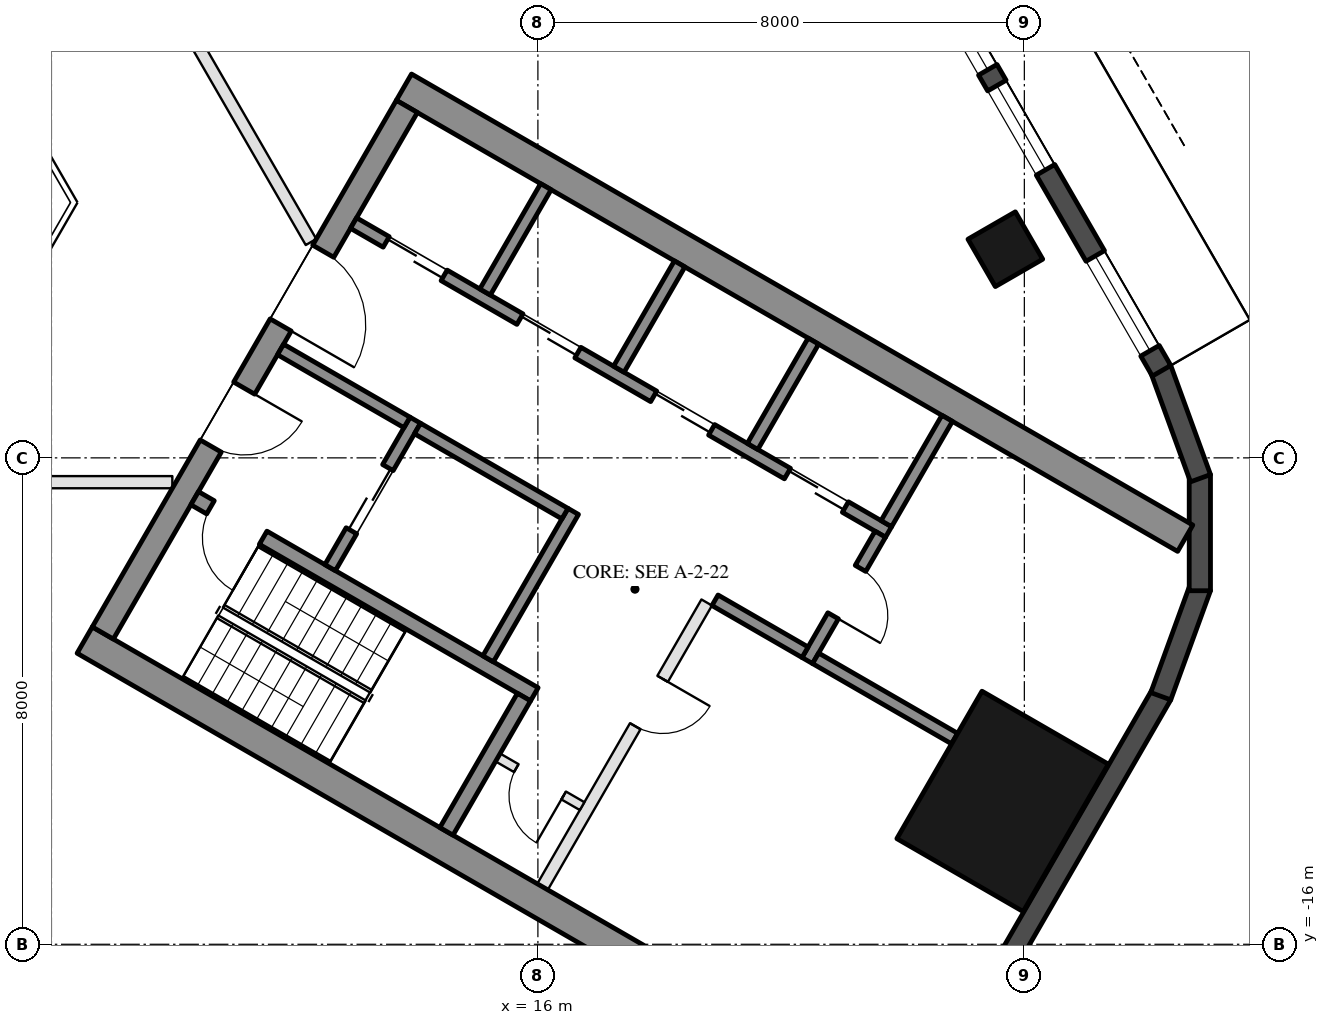
"""IFC4 building model, lengths in metres.
Left out: names, types, materials, properties, quantities, classifications, styles, units other than length and angle.
Written with IfcOpenShell. Run it as: python <this file> out.ifc"""

import sys

from ifc_helpers import new_model, si_unit, direction, frame, frame_2d, origin, origin_2d, place, context, subcontext, project, spatial, rectangle, hollow_rectangle, extrude, element, fill, save


model = new_model("IFC4")
c1 = context("Model", 3, precision=1e-05, world=origin(), true_north=direction((0.0, 1.0)))
c2 = subcontext(c1, "Body", "Model", "MODEL_VIEW")
j1 = project(units=[si_unit("LENGTHUNIT", "METRE"), si_unit("PLANEANGLEUNIT", "RADIAN")], contexts=[c1])
p1 = place(None, origin())
s1 = spatial("IfcSite", under=j1, at=p1, CompositionType="ELEMENT")
p2 = place(p1, origin())
s2 = spatial("IfcBuilding", under=s1, at=p2, CompositionType="ELEMENT")
p3 = place(p2, frame((0.0, 0.0, 102.0)))
s3 = spatial("IfcBuildingStorey", under=s2, at=p3, CompositionType="ELEMENT", Elevation=102.0)
p4 = place(p3, frame((23.688, -4.568, 0.0), z_axis=(0.0, 0.0, 1.0), x_axis=(-0.5, 0.866025403784, 0.0)))
e1 = element("IfcColumn", 1, at=p4, inside=s3, PredefinedType="COLUMN", context=c2, shape_type="SweptSolid", body=[
    extrude(hollow_rectangle(XDim=0.9, YDim=0.9, WallThickness=0.04, at=origin_2d()), origin(), (0.0, 0.0, 1.0), 3.7),
])
p5 = place(p3, frame((23.643, -13.65, 0.0), z_axis=(0.0, 0.0, 1.0), x_axis=(0.5, 0.866025403784, 0.0)))
e2 = element("IfcColumn", 2, at=p5, inside=s3, PredefinedType="COLUMN", context=c2, shape_type="SweptSolid", body=[
    extrude(hollow_rectangle(XDim=2.8, YDim=2.4, WallThickness=0.07, at=origin_2d()), origin(), (0.0, 0.0, 1.0), 3.7),
])
p6 = place(p3, frame((23.427, -16.792, 0.0), z_axis=(0.0, 0.0, 1.0), x_axis=(0.500018773155, 0.866014564827, 0.0)))
e3 = element("IfcWall", 3, at=p6, inside=s3, PredefinedType="SOLIDWALL", context=c2, shape_type="SweptSolid", body=[
    extrude(rectangle(XDim=5.658, YDim=0.35, at=frame_2d((2.829, 0.0))), origin(), (0.0, 0.0, 1.0), 3.55),
])
for number, where, z_axis, x_axis in (
    (4, (26.244, -11.92, 0.0), (0.0, 0.0, 1.0), (0.342, 0.94, 0.0)),
    (5, (26.886, -10.185, 0.0), (0.0, 0.0, 1.0), (0.0, 1.0, 0.0)),
    (6, (26.897, -8.335, 0.0), (0.0, 0.0, 1.0), (-0.342, 0.94, 0.0)),
):
    element("IfcWall", number, at=place(p3, frame(where, z_axis=z_axis, x_axis=x_axis)), inside=s3, PredefinedType="SOLIDWALL", context=c2, shape_type="SweptSolid", body=[
        extrude(rectangle(XDim=1.91, YDim=0.35, at=frame_2d((0.955, 0.0))), origin(), (0.0, 0.0, 1.0), 3.55),
    ])
p7 = place(p3, frame((26.257, -6.567, 0.0), z_axis=(0.0, 0.0, 1.0), x_axis=(-0.500023526245, 0.866011820475, 0.0)))
e7 = element("IfcWall", 7, at=p7, inside=s3, PredefinedType="SOLIDWALL", context=c2, shape_type="SweptSolid", body=[
    extrude(rectangle(XDim=11.816, YDim=0.35, at=frame_2d((5.908, 0.0))), origin(), (0.0, 0.0, 1.0), 3.55),
])
p8 = place(p7, frame((0.38, 0.0, 0.3)))
e8 = element("IfcOpeningElement", 8, at=p8, cuts=e7, PredefinedType="OPENING", context=c2, shape_type="SweptSolid", body=[
    extrude(rectangle(XDim=1.8, YDim=2.65, at=frame_2d((0.9, 1.325))), frame((0.0, 0.185, 0.0), z_axis=(0.0, -1.0, 0.0), x_axis=(1.0, 0.0, 0.0)), (0.0, 0.0, 1.0), 0.37),
])
p9 = place(p7, frame((7.716, 0.0, 0.0)))
e9 = element("IfcOpeningElement", 9, at=p9, cuts=e7, PredefinedType="OPENING", context=c2, shape_type="SweptSolid", body=[
    extrude(rectangle(XDim=2.4, YDim=2.4, at=frame_2d((1.2, 1.2))), frame((0.0, 0.185, 0.0), z_axis=(0.0, -1.0, 0.0), x_axis=(1.0, 0.0, 0.0)), (0.0, 0.0, 1.0), 0.37),
])
p10 = place(p7, frame((3.816, 0.0, 0.3)))
e10 = element("IfcOpeningElement", 10, at=p10, cuts=e7, PredefinedType="OPENING", context=c2, shape_type="SweptSolid", body=[
    extrude(rectangle(XDim=1.6, YDim=2.65, at=frame_2d((0.8, 1.325))), frame((0.0, 0.185, 0.0), z_axis=(0.0, -1.0, 0.0), x_axis=(1.0, 0.0, 0.0)), (0.0, 0.0, 1.0), 0.37),
])
p11 = place(p7, frame((5.716, 0.0, 0.3)))
e11 = element("IfcOpeningElement", 11, at=p11, cuts=e7, PredefinedType="OPENING", context=c2, shape_type="SweptSolid", body=[
    extrude(rectangle(XDim=1.6, YDim=2.65, at=frame_2d((0.8, 1.325))), frame((0.0, 0.185, 0.0), z_axis=(0.0, -1.0, 0.0), x_axis=(1.0, 0.0, 0.0)), (0.0, 0.0, 1.0), 0.37),
])
for number, where, z_axis, x_axis in (
    (12, (8.547, -10.997, 0.0), (0.0, 0.0, 1.0), (0.866, -0.5, 0.0)),
    (13, (13.797, -1.903, 0.0), (0.0, 0.0, 1.0), (0.866, -0.5, 0.0)),
):
    element("IfcWall", number, at=place(p3, frame(where, z_axis=z_axis, x_axis=x_axis)), inside=s3, PredefinedType="SHEAR", context=c2, shape_type="SweptSolid", body=[
        extrude(rectangle(XDim=14.837, YDim=0.5, at=frame_2d((7.418, 0.0))), origin(), (0.0, 0.0, 1.0), 3.5),
    ])
p12 = place(p3, frame((8.845, -10.88, 0.0), z_axis=(0.0, 0.0, 1.0), x_axis=(0.500004234368, 0.866022959057, 0.0)))
e14 = element("IfcWall", 14, at=p12, inside=s3, PredefinedType="SHEAR", context=c2, shape_type="SweptSolid", body=[
    extrude(rectangle(XDim=10.0, YDim=0.4, at=frame_2d((5.0, 0.0))), origin(), (0.0, 0.0, 1.0), 3.5),
])
p13 = place(p12, frame((3.55, 0.0, 0.0)))
e15 = element("IfcOpeningElement", 15, at=p13, cuts=e14, PredefinedType="OPENING", context=c2, shape_type="SweptSolid", body=[
    extrude(rectangle(XDim=1.1, YDim=2.1, at=frame_2d((0.55, 1.05))), frame((0.0, 0.21, 0.0), z_axis=(0.0, -1.0, 0.0), x_axis=(1.0, 0.0, 0.0)), (0.0, 0.0, 1.0), 0.42),
])
p14 = place(p12, frame((5.85, 0.0, 0.0)))
e16 = element("IfcOpeningElement", 16, at=p14, cuts=e14, PredefinedType="OPENING", context=c2, shape_type="SweptSolid", body=[
    extrude(rectangle(XDim=1.4, YDim=2.1, at=frame_2d((0.7, 1.05))), frame((0.0, 0.21, 0.0), z_axis=(0.0, -1.0, 0.0), x_axis=(1.0, 0.0, 0.0)), (0.0, 0.0, 1.0), 0.42),
])
p15 = place(p3, frame((10.356, -8.664, 0.0), z_axis=(0.0, 0.0, 1.0), x_axis=(0.866028629588, -0.499994412703, 0.0)))
e17 = element("IfcWall", 17, at=p15, inside=s3, PredefinedType="SHEAR", context=c2, shape_type="SweptSolid", body=[
    extrude(rectangle(XDim=6.45, YDim=0.25, at=frame_2d((3.225, 0.0))), origin(), (0.0, 0.0, 1.0), 3.5),
])
p16 = place(p15, frame((0.3, 0.0, 0.0)))
e18 = element("IfcOpeningElement", 18, at=p16, cuts=e17, PredefinedType="OPENING", context=c2, shape_type="SweptSolid", body=[
    extrude(rectangle(XDim=1.0, YDim=2.1, at=frame_2d((0.5, 1.05))), frame((0.0, 0.135, 0.0), z_axis=(0.0, -1.0, 0.0), x_axis=(1.0, 0.0, 0.0)), (0.0, 0.0, 1.0), 0.27),
])
p17 = place(p3, frame((14.496, -14.143, 0.0), z_axis=(0.0, 0.0, 1.0), x_axis=(0.500062241894, 0.865989465428, 0.0)))
e19 = element("IfcWall", 19, at=p17, inside=s3, PredefinedType="SHEAR", context=c2, shape_type="SweptSolid", body=[
    extrude(rectangle(XDim=2.55, YDim=0.25, at=frame_2d((1.275, 0.0))), origin(), (0.0, 0.0, 1.0), 3.5),
])
p18 = place(p3, frame((15.181, -11.305, 0.0), z_axis=(0.0, 0.0, 1.0), x_axis=(0.49994636267, 0.866056369097, 0.0)))
e20 = element("IfcWall", 20, at=p18, inside=s3, PredefinedType="SHEAR", context=c2, shape_type="SweptSolid", body=[
    extrude(rectangle(XDim=2.8, YDim=0.2, at=frame_2d((1.4, 0.0))), origin(), (0.0, 0.0, 1.0), 3.5),
])
p19 = place(p3, frame((12.583, -9.805, 0.0), z_axis=(0.0, 0.0, 1.0), x_axis=(0.49994636267, 0.866056369097, 0.0)))
e21 = element("IfcWall", 21, at=p19, inside=s3, PredefinedType="SHEAR", context=c2, shape_type="SweptSolid", body=[
    extrude(rectangle(XDim=2.8, YDim=0.2, at=frame_2d((1.4, 0.0))), origin(), (0.0, 0.0, 1.0), 3.5),
])
p20 = place(p19, frame((0.7, 0.0, 0.0)))
e22 = element("IfcOpeningElement", 22, at=p20, cuts=e21, PredefinedType="OPENING", context=c2, shape_type="SweptSolid", body=[
    extrude(rectangle(XDim=1.2, YDim=2.1, at=frame_2d((0.6, 1.05))), frame((0.0, 0.11, 0.0), z_axis=(0.0, -1.0, 0.0), x_axis=(1.0, 0.0, 0.0)), (0.0, 0.0, 1.0), 0.22),
])
p21 = place(p3, frame((11.768, -6.217, 0.0), z_axis=(0.0, 0.0, 1.0), x_axis=(0.866050077142, -0.499957262057, 0.0)))
e23 = element("IfcWall", 23, at=p21, inside=s3, PredefinedType="SHEAR", context=c2, shape_type="SweptSolid", body=[
    extrude(rectangle(XDim=2.4, YDim=0.2, at=frame_2d((1.2, 0.0))), origin(), (0.0, 0.0, 1.0), 3.5),
])
p22 = place(p3, frame((14.02, -7.517, 0.0), z_axis=(0.0, 0.0, 1.0), x_axis=(0.866034573852, -0.49998411664, 0.0)))
e24 = element("IfcWall", 24, at=p22, inside=s3, PredefinedType="SHEAR", context=c2, shape_type="SweptSolid", body=[
    extrude(rectangle(XDim=2.8, YDim=0.2, at=frame_2d((1.4, 0.0))), origin(), (0.0, 0.0, 1.0), 3.5),
])
p23 = place(p3, frame((12.968, -4.138, 0.0), z_axis=(0.0, 0.0, 1.0), x_axis=(0.866028328073, -0.49999493495, 0.0)))
e25 = element("IfcWall", 25, at=p23, inside=s3, PredefinedType="SHEAR", context=c2, shape_type="SweptSolid", body=[
    extrude(rectangle(XDim=10.16, YDim=0.2, at=frame_2d((5.08, 0.0))), origin(), (0.0, 0.0, 1.0), 3.5),
])
p24 = place(p23, frame((0.62, 0.0, 0.0)))
e26 = element("IfcOpeningElement", 26, at=p24, cuts=e25, PredefinedType="OPENING", context=c2, shape_type="SweptSolid", body=[
    extrude(rectangle(XDim=1.1, YDim=2.1, at=frame_2d((0.55, 1.05))), frame((0.0, 0.11, 0.0), z_axis=(0.0, -1.0, 0.0), x_axis=(1.0, 0.0, 0.0)), (0.0, 0.0, 1.0), 0.22),
])
p25 = place(p23, frame((3.16, 0.0, 0.0)))
e27 = element("IfcOpeningElement", 27, at=p25, cuts=e25, PredefinedType="OPENING", context=c2, shape_type="SweptSolid", body=[
    extrude(rectangle(XDim=1.1, YDim=2.1, at=frame_2d((0.55, 1.05))), frame((0.0, 0.11, 0.0), z_axis=(0.0, -1.0, 0.0), x_axis=(1.0, 0.0, 0.0)), (0.0, 0.0, 1.0), 0.22),
])
p26 = place(p23, frame((5.7, 0.0, 0.0)))
e28 = element("IfcOpeningElement", 28, at=p26, cuts=e25, PredefinedType="OPENING", context=c2, shape_type="SweptSolid", body=[
    extrude(rectangle(XDim=1.1, YDim=2.1, at=frame_2d((0.55, 1.05))), frame((0.0, 0.11, 0.0), z_axis=(0.0, -1.0, 0.0), x_axis=(1.0, 0.0, 0.0)), (0.0, 0.0, 1.0), 0.22),
])
p27 = place(p23, frame((8.24, 0.0, 0.0)))
e29 = element("IfcOpeningElement", 29, at=p27, cuts=e25, PredefinedType="OPENING", context=c2, shape_type="SweptSolid", body=[
    extrude(rectangle(XDim=1.1, YDim=2.1, at=frame_2d((0.55, 1.05))), frame((0.0, 0.11, 0.0), z_axis=(0.0, -1.0, 0.0), x_axis=(1.0, 0.0, 0.0)), (0.0, 0.0, 1.0), 0.22),
])
p28 = place(p3, frame((20.43, -11.333, 0.0), z_axis=(0.0, 0.0, 1.0), x_axis=(0.500001309137, 0.866024647952, 0.0)))
e30 = element("IfcWall", 30, at=p28, inside=s3, PredefinedType="SHEAR", context=c2, shape_type="SweptSolid", body=[
    extrude(rectangle(XDim=2.4, YDim=0.2, at=frame_2d((1.2, 0.0))), origin(), (0.0, 0.0, 1.0), 3.5),
])
p29 = place(p28, frame((0.85, 0.0, 0.0)))
e31 = element("IfcOpeningElement", 31, at=p29, cuts=e30, PredefinedType="OPENING", context=c2, shape_type="SweptSolid", body=[
    extrude(rectangle(XDim=0.9, YDim=2.1, at=frame_2d((0.45, 1.05))), frame((0.0, 0.11, 0.0), z_axis=(0.0, -1.0, 0.0), x_axis=(1.0, 0.0, 0.0)), (0.0, 0.0, 1.0), 0.22),
])
p30 = place(p3, frame((18.913, -10.342, 0.0), z_axis=(0.0, 0.0, 1.0), x_axis=(0.866038183914, -0.499977863513, 0.0)))
e32 = element("IfcWall", 32, at=p30, inside=s3, PredefinedType="SHEAR", context=c2, shape_type="SweptSolid", body=[
    extrude(rectangle(XDim=1.71, YDim=0.2, at=frame_2d((0.855, 0.0))), origin(), (0.0, 0.0, 1.0), 3.5),
])
for number, where, z_axis, x_axis in (
    (33, (15.131, -5.272, 0.0), (0.0, 0.0, 1.0), (0.5, 0.866, 0.0)),
    (34, (17.331, -6.542, 0.0), (0.0, 0.0, 1.0), (0.5, 0.866, 0.0)),
    (35, (19.531, -7.812, 0.0), (0.0, 0.0, 1.0), (0.5, 0.866, 0.0)),
    (36, (21.73, -9.082, 0.0), (0.0, 0.0, 1.0), (0.5, 0.866, 0.0)),
):
    element("IfcWall", number, at=place(p3, frame(where, z_axis=z_axis, x_axis=x_axis)), inside=s3, PredefinedType="SHEAR", context=c2, shape_type="SweptSolid", body=[
        extrude(rectangle(XDim=2.0, YDim=0.2, at=frame_2d((1.0, 0.0))), origin(), (0.0, 0.0, 1.0), 3.5),
    ])
p31 = place(p3, frame((20.567, -11.297, 0.0), z_axis=(0.0, 0.0, 1.0), x_axis=(0.866060851709, -0.499938597367, 0.0)))
e37 = element("IfcWall", 37, at=p31, inside=s3, PredefinedType="SHEAR", context=c2, shape_type="SweptSolid", body=[
    extrude(rectangle(XDim=2.64, YDim=0.2, at=frame_2d((1.32, 0.0))), origin(), (0.0, 0.0, 1.0), 3.5),
])
p32 = place(p3, frame((16.076, -15.055, 0.0), z_axis=(0.0, 0.0, 1.0), x_axis=(0.499995103361, 0.866028230842, 0.0)))
e38 = element("IfcWall", 38, at=p32, inside=s3, PredefinedType="PARTITIONING", context=c2, shape_type="SweptSolid", body=[
    extrude(rectangle(XDim=5.4, YDim=0.2, at=frame_2d((2.7, 0.0))), origin(), (0.0, 0.0, 1.0), 3.5),
])
p33 = place(p32, frame((3.05, 0.0, 0.0)))
e39 = element("IfcOpeningElement", 39, at=p33, cuts=e38, PredefinedType="OPENING", context=c2, shape_type="SweptSolid", body=[
    extrude(rectangle(XDim=0.9, YDim=2.1, at=frame_2d((0.45, 1.05))), frame((0.0, 0.11, 0.0), z_axis=(0.0, -1.0, 0.0), x_axis=(1.0, 0.0, 0.0)), (0.0, 0.0, 1.0), 0.22),
])
p34 = place(p3, frame((15.342, -12.928, 0.0), z_axis=(0.0, 0.0, 1.0), x_axis=(0.865989903783, -0.500061482766, 0.0)))
e40 = element("IfcWall", 40, at=p34, inside=s3, PredefinedType="PARTITIONING", context=c2, shape_type="SweptSolid", body=[
    extrude(rectangle(XDim=1.6, YDim=0.15, at=frame_2d((0.8, 0.0))), origin(), (0.0, 0.0, 1.0), 3.5),
])
p35 = place(p34, frame((0.35, 0.0, 0.0)))
e41 = element("IfcOpeningElement", 41, at=p35, cuts=e40, PredefinedType="OPENING", context=c2, shape_type="SweptSolid", body=[
    extrude(rectangle(XDim=0.9, YDim=2.1, at=frame_2d((0.45, 1.05))), frame((0.0, 0.085, 0.0), z_axis=(0.0, -1.0, 0.0), x_axis=(1.0, 0.0, 0.0)), (0.0, 0.0, 1.0), 0.17),
])
p36 = place(p3, frame((9.988, -8.4, 0.0), z_axis=(0.0, 0.0, 1.0), x_axis=(-1.0, 0.0, 0.0)))
e42 = element("IfcWall", 42, at=p36, inside=s3, PredefinedType="PARTITIONING", context=c2, shape_type="SweptSolid", body=[
    extrude(rectangle(XDim=10.594, YDim=0.2, at=frame_2d((5.297, 0.0))), origin(), (0.0, 0.0, 1.0), 2.95),
])
p37 = place(p36, frame((4.797, 0.0, 0.0)))
e43 = element("IfcOpeningElement", 43, at=p37, cuts=e42, PredefinedType="OPENING", context=c2, shape_type="SweptSolid", body=[
    extrude(rectangle(XDim=1.0, YDim=2.1, at=frame_2d((0.5, 1.05))), frame((0.0, 0.11, 0.0), z_axis=(0.0, -1.0, 0.0), x_axis=(1.0, 0.0, 0.0)), (0.0, 0.0, 1.0), 0.22),
])
p38 = place(p3, frame((7.577, 3.676, 0.0), z_axis=(0.0, 0.0, 1.0), x_axis=(0.500017489778, -0.866015305821, 0.0)))
e44 = element("IfcWall", 44, at=p38, inside=s3, PredefinedType="PARTITIONING", context=c2, shape_type="SweptSolid", body=[
    extrude(rectangle(XDim=9.384, YDim=0.2, at=frame_2d((4.692, 0.0))), origin(), (0.0, 0.0, 1.0), 2.95),
])
p39 = place(p38, frame((4.192, 0.0, 0.0)))
e45 = element("IfcOpeningElement", 45, at=p39, cuts=e44, PredefinedType="OPENING", context=c2, shape_type="SweptSolid", body=[
    extrude(rectangle(XDim=1.0, YDim=2.1, at=frame_2d((0.5, 1.05))), frame((0.0, 0.11, 0.0), z_axis=(0.0, -1.0, 0.0), x_axis=(1.0, 0.0, 0.0)), (0.0, 0.0, 1.0), 0.22),
])
p40 = place(p8, origin())
e46 = element("IfcWindow", 46, at=p40, inside=s3, PartitioningType="SINGLE_PANEL", PredefinedType="WINDOW", context=c2, shape_type="SweptSolid", body=[
    extrude(rectangle(XDim=1.8, YDim=2.65, at=frame_2d((0.9, 1.325))), frame((0.0, 0.03, 0.0), z_axis=(0.0, -1.0, 0.0), x_axis=(1.0, 0.0, 0.0)), (0.0, 0.0, 1.0), 0.06),
])
fill(e8, e46)
p41 = place(p10, origin())
e47 = element("IfcWindow", 47, at=p41, inside=s3, PartitioningType="SINGLE_PANEL", PredefinedType="WINDOW", context=c2, shape_type="SweptSolid", body=[
    extrude(rectangle(XDim=1.6, YDim=2.65, at=frame_2d((0.8, 1.325))), frame((0.0, 0.03, 0.0), z_axis=(0.0, -1.0, 0.0), x_axis=(1.0, 0.0, 0.0)), (0.0, 0.0, 1.0), 0.06),
])
fill(e10, e47)
p42 = place(p11, origin())
e48 = element("IfcWindow", 48, at=p42, inside=s3, PartitioningType="SINGLE_PANEL", PredefinedType="WINDOW", context=c2, shape_type="SweptSolid", body=[
    extrude(rectangle(XDim=1.6, YDim=2.65, at=frame_2d((0.8, 1.325))), frame((0.0, 0.03, 0.0), z_axis=(0.0, -1.0, 0.0), x_axis=(1.0, 0.0, 0.0)), (0.0, 0.0, 1.0), 0.06),
])
fill(e11, e48)
p43 = place(p20, origin())
e49 = element("IfcDoor", 49, at=p43, inside=s3, OperationType="DOUBLE_DOOR_SLIDING", PredefinedType="DOOR", context=c2, shape_type="SweptSolid", body=[
    extrude(rectangle(XDim=1.2, YDim=2.1, at=frame_2d((0.6, 1.05))), frame((0.0, 0.025, 0.0), z_axis=(0.0, -1.0, 0.0), x_axis=(1.0, 0.0, 0.0)), (0.0, 0.0, 1.0), 0.05),
])
fill(e22, e49)
p44 = place(p35, frame((0.9, 0.0, 0.0), z_axis=(0.0, 0.0, 1.0), x_axis=(-1.0, 0.0, 0.0)))
e50 = element("IfcDoor", 50, at=p44, inside=s3, OperationType="SINGLE_SWING_LEFT", PredefinedType="DOOR", context=c2, shape_type="SweptSolid", body=[
    extrude(rectangle(XDim=0.9, YDim=2.1, at=frame_2d((0.45, 1.05))), frame((0.0, 0.025, 0.0), z_axis=(0.0, -1.0, 0.0), x_axis=(1.0, 0.0, 0.0)), (0.0, 0.0, 1.0), 0.05),
])
fill(e41, e50)
p45 = place(p24, origin())
e51 = element("IfcDoor", 51, at=p45, inside=s3, OperationType="DOUBLE_DOOR_SLIDING", PredefinedType="DOOR", context=c2, shape_type="SweptSolid", body=[
    extrude(rectangle(XDim=1.1, YDim=2.1, at=frame_2d((0.55, 1.05))), frame((0.0, 0.025, 0.0), z_axis=(0.0, -1.0, 0.0), x_axis=(1.0, 0.0, 0.0)), (0.0, 0.0, 1.0), 0.05),
])
fill(e26, e51)
p46 = place(p25, origin())
e52 = element("IfcDoor", 52, at=p46, inside=s3, OperationType="DOUBLE_DOOR_SLIDING", PredefinedType="DOOR", context=c2, shape_type="SweptSolid", body=[
    extrude(rectangle(XDim=1.1, YDim=2.1, at=frame_2d((0.55, 1.05))), frame((0.0, 0.025, 0.0), z_axis=(0.0, -1.0, 0.0), x_axis=(1.0, 0.0, 0.0)), (0.0, 0.0, 1.0), 0.05),
])
fill(e27, e52)
p47 = place(p26, origin())
e53 = element("IfcDoor", 53, at=p47, inside=s3, OperationType="DOUBLE_DOOR_SLIDING", PredefinedType="DOOR", context=c2, shape_type="SweptSolid", body=[
    extrude(rectangle(XDim=1.1, YDim=2.1, at=frame_2d((0.55, 1.05))), frame((0.0, 0.025, 0.0), z_axis=(0.0, -1.0, 0.0), x_axis=(1.0, 0.0, 0.0)), (0.0, 0.0, 1.0), 0.05),
])
fill(e28, e53)
p48 = place(p27, origin())
e54 = element("IfcDoor", 54, at=p48, inside=s3, OperationType="DOUBLE_DOOR_SLIDING", PredefinedType="DOOR", context=c2, shape_type="SweptSolid", body=[
    extrude(rectangle(XDim=1.1, YDim=2.1, at=frame_2d((0.55, 1.05))), frame((0.0, 0.025, 0.0), z_axis=(0.0, -1.0, 0.0), x_axis=(1.0, 0.0, 0.0)), (0.0, 0.0, 1.0), 0.05),
])
fill(e29, e54)
p49 = place(p29, frame((0.9, 0.0, 0.0), z_axis=(0.0, 0.0, 1.0), x_axis=(-1.0, 0.0, 0.0)))
e55 = element("IfcDoor", 55, at=p49, inside=s3, OperationType="SINGLE_SWING_RIGHT", PredefinedType="DOOR", context=c2, shape_type="SweptSolid", body=[
    extrude(rectangle(XDim=0.9, YDim=2.1, at=frame_2d((0.45, 1.05))), frame((0.0, 0.025, 0.0), z_axis=(0.0, -1.0, 0.0), x_axis=(1.0, 0.0, 0.0)), (0.0, 0.0, 1.0), 0.05),
])
fill(e31, e55)
p50 = place(p33, frame((0.9, 0.0, 0.0), z_axis=(0.0, 0.0, 1.0), x_axis=(-1.0, 0.0, 0.0)))
e56 = element("IfcDoor", 56, at=p50, inside=s3, OperationType="SINGLE_SWING_LEFT", PredefinedType="DOOR", context=c2, shape_type="SweptSolid", body=[
    extrude(rectangle(XDim=0.9, YDim=2.1, at=frame_2d((0.45, 1.05))), frame((0.0, 0.025, 0.0), z_axis=(0.0, -1.0, 0.0), x_axis=(1.0, 0.0, 0.0)), (0.0, 0.0, 1.0), 0.05),
])
fill(e39, e56)
p51 = place(p13, frame((1.1, 0.0, 0.0), z_axis=(0.0, 0.0, 1.0), x_axis=(-1.0, 0.0, 0.0)))
e57 = element("IfcDoor", 57, at=p51, inside=s3, OperationType="SINGLE_SWING_LEFT", PredefinedType="DOOR", context=c2, shape_type="SweptSolid", body=[
    extrude(rectangle(XDim=1.1, YDim=2.1, at=frame_2d((0.55, 1.05))), frame((0.0, 0.025, 0.0), z_axis=(0.0, -1.0, 0.0), x_axis=(1.0, 0.0, 0.0)), (0.0, 0.0, 1.0), 0.05),
])
fill(e15, e57)
p52 = place(p14, frame((1.4, 0.0, 0.0), z_axis=(0.0, 0.0, 1.0), x_axis=(-1.0, 0.0, 0.0)))
e58 = element("IfcDoor", 58, at=p52, inside=s3, OperationType="DOUBLE_DOOR_SINGLE_SWING", PredefinedType="DOOR", context=c2, shape_type="SweptSolid", body=[
    extrude(rectangle(XDim=1.4, YDim=2.1, at=frame_2d((0.7, 1.05))), frame((0.0, 0.025, 0.0), z_axis=(0.0, -1.0, 0.0), x_axis=(1.0, 0.0, 0.0)), (0.0, 0.0, 1.0), 0.05),
])
fill(e16, e58)
p53 = place(p16, frame((1.0, 0.0, 0.0), z_axis=(0.0, 0.0, 1.0), x_axis=(-1.0, 0.0, 0.0)))
e59 = element("IfcDoor", 59, at=p53, inside=s3, OperationType="SINGLE_SWING_LEFT", PredefinedType="DOOR", context=c2, shape_type="SweptSolid", body=[
    extrude(rectangle(XDim=1.0, YDim=2.1, at=frame_2d((0.5, 1.05))), frame((0.0, 0.025, 0.0), z_axis=(0.0, -1.0, 0.0), x_axis=(1.0, 0.0, 0.0)), (0.0, 0.0, 1.0), 0.05),
])
fill(e18, e59)
save(model, sys.argv[1])
